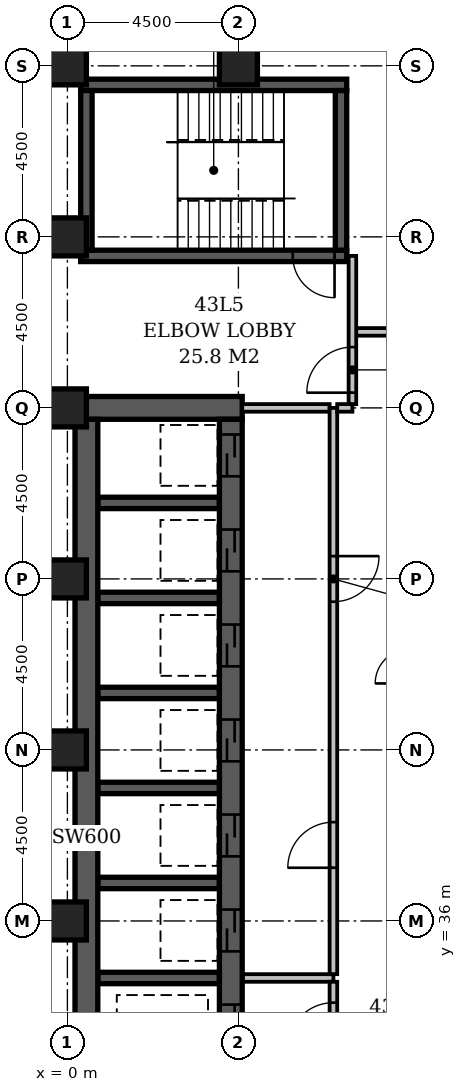
"""IFC4 building model, lengths in metres.
Left out: names, types, materials, properties, quantities, classifications, styles, units other than length and angle.
Written with IfcOpenShell. Run it as: python <this file> out.ifc"""

import sys

from ifc_helpers import new_model, si_unit, direction, frame, frame_2d, origin, origin_2d, place, context, subcontext, project, spatial, rectangle, extrude, element, fill, save


model = new_model("IFC4")
c1 = context("Model", 3, precision=1e-05, world=origin(), true_north=direction((0.0, 1.0)))
c2 = subcontext(c1, "Body", "Model", "MODEL_VIEW")
j1 = project(units=[si_unit("LENGTHUNIT", "METRE"), si_unit("PLANEANGLEUNIT", "RADIAN")], contexts=[c1])
p1 = place(None, origin())
s1 = spatial("IfcSite", under=j1, at=p1, CompositionType="ELEMENT")
p2 = place(p1, origin())
s2 = spatial("IfcBuilding", under=s1, at=p2, CompositionType="ELEMENT")
p3 = place(p2, frame((0.0, 0.0, 170.0)))
s3 = spatial("IfcBuildingStorey", under=s2, at=p3, CompositionType="ELEMENT", Elevation=170.0)
p4 = place(p3, frame((0.2, 49.5, -0.3), z_axis=(0.0, 0.0, 1.0), x_axis=(1.0, 0.0, 0.0)))
e1 = element("IfcWall", 1, at=p4, inside=s3, PredefinedType="SHEAR", context=c2, shape_type="SweptSolid", body=[
    extrude(rectangle(XDim=4.4, YDim=0.6, at=frame_2d((2.2, 0.0))), origin(), (0.0, 0.0, 1.0), 3.45),
])
p5 = place(p3, frame((0.35, 53.5, -0.3), z_axis=(0.0, 0.0, 1.0), x_axis=(1.0, 0.0, 0.0)))
e2 = element("IfcWall", 2, at=p5, inside=s3, PredefinedType="SHEAR", context=c2, shape_type="SweptSolid", body=[
    extrude(rectangle(XDim=7.0, YDim=0.3, at=frame_2d((3.5, 0.0))), origin(), (0.0, 0.0, 1.0), 3.45),
])
p6 = place(p5, frame((5.58, 0.0, 0.3)))
e3 = element("IfcOpeningElement", 3, at=p6, cuts=e2, PredefinedType="OPENING", context=c2, shape_type="SweptSolid", body=[
    extrude(rectangle(XDim=1.1, YDim=2.1, at=frame_2d((0.55, 1.05))), frame((0.0, 0.162, 0.0), z_axis=(0.0, -1.0, 0.0), x_axis=(1.0, 0.0, 0.0)), (0.0, 0.0, 1.0), 0.324),
])
p7 = place(p3, frame((0.35, 58.0, -0.3), z_axis=(0.0, 0.0, 1.0), x_axis=(1.0, 0.0, 0.0)))
e4 = element("IfcWall", 4, at=p7, inside=s3, PredefinedType="SHEAR", context=c2, shape_type="SweptSolid", body=[
    extrude(rectangle(XDim=7.0, YDim=0.3, at=frame_2d((3.5, 0.0))), origin(), (0.0, 0.0, 1.0), 3.45),
])
p8 = place(p3, frame((0.5, 27.15, -0.3), z_axis=(0.0, 0.0, 1.0), x_axis=(0.0, 1.0, 0.0)))
e5 = element("IfcWall", 5, at=p8, inside=s3, PredefinedType="SHEAR", context=c2, shape_type="SweptSolid", body=[
    extrude(rectangle(XDim=22.05, YDim=0.6, at=frame_2d((11.025, 0.0))), origin(), (0.0, 0.0, 1.0), 3.45),
])
p9 = place(p3, frame((0.5, 53.65, -0.3), z_axis=(0.0, 0.0, 1.0), x_axis=(0.0, 1.0, 0.0)))
e6 = element("IfcWall", 6, at=p9, inside=s3, PredefinedType="SHEAR", context=c2, shape_type="SweptSolid", body=[
    extrude(rectangle(XDim=4.2, YDim=0.3, at=frame_2d((2.1, 0.0))), origin(), (0.0, 0.0, 1.0), 3.45),
])
for number, where, z_axis, x_axis in (
    (7, (0.8, 34.5, -0.3), (0.0, 0.0, 1.0), (1.0, 0.0, 0.0)),
    (8, (0.8, 37.0, -0.3), (0.0, 0.0, 1.0), (1.0, 0.0, 0.0)),
    (9, (0.8, 39.5, -0.3), (0.0, 0.0, 1.0), (1.0, 0.0, 0.0)),
    (10, (0.8, 42.0, -0.3), (0.0, 0.0, 1.0), (1.0, 0.0, 0.0)),
    (11, (0.8, 44.5, -0.3), (0.0, 0.0, 1.0), (1.0, 0.0, 0.0)),
    (12, (0.8, 47.0, -0.3), (0.0, 0.0, 1.0), (1.0, 0.0, 0.0)),
):
    element("IfcWall", number, at=place(p3, frame(where, z_axis=z_axis, x_axis=x_axis)), inside=s3, PredefinedType="SHEAR", context=c2, shape_type="SweptSolid", body=[
        extrude(rectangle(XDim=3.2, YDim=0.3, at=frame_2d((1.6, 0.0))), origin(), (0.0, 0.0, 1.0), 3.45),
    ])
p10 = place(p3, frame((4.3, 27.15, -0.3), z_axis=(0.0, 0.0, 1.0), x_axis=(0.0, 1.0, 0.0)))
e13 = element("IfcWall", 13, at=p10, inside=s3, PredefinedType="SHEAR", context=c2, shape_type="SweptSolid", body=[
    extrude(rectangle(XDim=22.05, YDim=0.6, at=frame_2d((11.025, 0.0))), origin(), (0.0, 0.0, 1.0), 3.45),
])
p11 = place(p10, frame((3.05, 0.0, 0.3)))
e14 = element("IfcOpeningElement", 14, at=p11, cuts=e13, PredefinedType="OPENING", context=c2, shape_type="SweptSolid", body=[
    extrude(rectangle(XDim=1.1, YDim=2.1, at=frame_2d((0.55, 1.05))), frame((0.0, 0.312, 0.0), z_axis=(0.0, -1.0, 0.0), x_axis=(1.0, 0.0, 0.0)), (0.0, 0.0, 1.0), 0.624),
])
p12 = place(p10, frame((0.55, 0.0, 0.3)))
e15 = element("IfcOpeningElement", 15, at=p12, cuts=e13, PredefinedType="OPENING", context=c2, shape_type="SweptSolid", body=[
    extrude(rectangle(XDim=1.1, YDim=2.1, at=frame_2d((0.55, 1.05))), frame((0.0, 0.312, 0.0), z_axis=(0.0, -1.0, 0.0), x_axis=(1.0, 0.0, 0.0)), (0.0, 0.0, 1.0), 0.624),
])
p13 = place(p10, frame((20.55, 0.0, 0.3)))
e16 = element("IfcOpeningElement", 16, at=p13, cuts=e13, PredefinedType="OPENING", context=c2, shape_type="SweptSolid", body=[
    extrude(rectangle(XDim=1.1, YDim=2.1, at=frame_2d((0.55, 1.05))), frame((0.0, 0.312, 0.0), z_axis=(0.0, -1.0, 0.0), x_axis=(1.0, 0.0, 0.0)), (0.0, 0.0, 1.0), 0.624),
])
p14 = place(p10, frame((18.05, 0.0, 0.3)))
e17 = element("IfcOpeningElement", 17, at=p14, cuts=e13, PredefinedType="OPENING", context=c2, shape_type="SweptSolid", body=[
    extrude(rectangle(XDim=1.1, YDim=2.1, at=frame_2d((0.55, 1.05))), frame((0.0, 0.312, 0.0), z_axis=(0.0, -1.0, 0.0), x_axis=(1.0, 0.0, 0.0)), (0.0, 0.0, 1.0), 0.624),
])
p15 = place(p10, frame((15.55, 0.0, 0.3)))
e18 = element("IfcOpeningElement", 18, at=p15, cuts=e13, PredefinedType="OPENING", context=c2, shape_type="SweptSolid", body=[
    extrude(rectangle(XDim=1.1, YDim=2.1, at=frame_2d((0.55, 1.05))), frame((0.0, 0.312, 0.0), z_axis=(0.0, -1.0, 0.0), x_axis=(1.0, 0.0, 0.0)), (0.0, 0.0, 1.0), 0.624),
])
p16 = place(p10, frame((13.05, 0.0, 0.3)))
e19 = element("IfcOpeningElement", 19, at=p16, cuts=e13, PredefinedType="OPENING", context=c2, shape_type="SweptSolid", body=[
    extrude(rectangle(XDim=1.1, YDim=2.1, at=frame_2d((0.55, 1.05))), frame((0.0, 0.312, 0.0), z_axis=(0.0, -1.0, 0.0), x_axis=(1.0, 0.0, 0.0)), (0.0, 0.0, 1.0), 0.624),
])
p17 = place(p10, frame((10.55, 0.0, 0.3)))
e20 = element("IfcOpeningElement", 20, at=p17, cuts=e13, PredefinedType="OPENING", context=c2, shape_type="SweptSolid", body=[
    extrude(rectangle(XDim=1.1, YDim=2.1, at=frame_2d((0.55, 1.05))), frame((0.0, 0.312, 0.0), z_axis=(0.0, -1.0, 0.0), x_axis=(1.0, 0.0, 0.0)), (0.0, 0.0, 1.0), 0.624),
])
p18 = place(p10, frame((8.05, 0.0, 0.3)))
e21 = element("IfcOpeningElement", 21, at=p18, cuts=e13, PredefinedType="OPENING", context=c2, shape_type="SweptSolid", body=[
    extrude(rectangle(XDim=1.1, YDim=2.1, at=frame_2d((0.55, 1.05))), frame((0.0, 0.312, 0.0), z_axis=(0.0, -1.0, 0.0), x_axis=(1.0, 0.0, 0.0)), (0.0, 0.0, 1.0), 0.624),
])
p19 = place(p10, frame((5.55, 0.0, 0.3)))
e22 = element("IfcOpeningElement", 22, at=p19, cuts=e13, PredefinedType="OPENING", context=c2, shape_type="SweptSolid", body=[
    extrude(rectangle(XDim=1.1, YDim=2.1, at=frame_2d((0.55, 1.05))), frame((0.0, 0.312, 0.0), z_axis=(0.0, -1.0, 0.0), x_axis=(1.0, 0.0, 0.0)), (0.0, 0.0, 1.0), 0.624),
])
p20 = place(p3, frame((7.2, 53.65, -0.3), z_axis=(0.0, 0.0, 1.0), x_axis=(0.0, 1.0, 0.0)))
e23 = element("IfcWall", 23, at=p20, inside=s3, PredefinedType="SHEAR", context=c2, shape_type="SweptSolid", body=[
    extrude(rectangle(XDim=4.2, YDim=0.3, at=frame_2d((2.1, 0.0))), origin(), (0.0, 0.0, 1.0), 3.45),
])
for number, where, z_axis, x_axis in (
    (24, (0.0, 36.0, -0.3), (0.0, 0.0, 1.0), (1.0, 0.0, 0.0)),
    (25, (0.0, 40.5, -0.3), (0.0, 0.0, 1.0), (1.0, 0.0, 0.0)),
    (26, (0.0, 45.0, -0.3), (0.0, 0.0, 1.0), (1.0, 0.0, 0.0)),
    (27, (0.0, 49.5, -0.3), (0.0, 0.0, 1.0), (1.0, 0.0, 0.0)),
    (28, (0.0, 54.0, -0.3), (0.0, 0.0, 1.0), (1.0, 0.0, 0.0)),
    (29, (0.0, 58.5, -0.3), (0.0, 0.0, 1.0), (1.0, 0.0, 0.0)),
    (30, (4.5, 58.5, -0.3), (0.0, 0.0, 1.0), (1.0, 0.0, 0.0)),
):
    element("IfcColumn", number, at=place(p3, frame(where, z_axis=z_axis, x_axis=x_axis)), inside=s3, PredefinedType="COLUMN", context=c2, shape_type="SweptSolid", body=[
        extrude(rectangle(XDim=1.0, YDim=1.0, at=origin_2d()), origin(), (0.0, 0.0, 1.0), 3.45),
    ])
p21 = place(p3, frame((4.62, 34.5, 0.0), z_axis=(0.0, 0.0, 1.0), x_axis=(1.0, 0.0, 0.0)))
e31 = element("IfcWall", 31, at=p21, inside=s3, PredefinedType="PARTITIONING", context=c2, shape_type="SweptSolid", body=[
    extrude(rectangle(XDim=2.38, YDim=0.2, at=frame_2d((1.19, 0.0))), origin(), (0.0, 0.0, 1.0), 3.15),
])
p22 = place(p3, frame((7.0, 34.6, 0.0), z_axis=(0.0, 0.0, 1.0), x_axis=(0.0, 1.0, 0.0)))
e32 = element("IfcWall", 32, at=p22, inside=s3, PredefinedType="PARTITIONING", context=c2, shape_type="SweptSolid", body=[
    extrude(rectangle(XDim=14.9, YDim=0.2, at=frame_2d((7.45, 0.0))), origin(), (0.0, 0.0, 1.0), 3.15),
])
p23 = place(p22, frame((2.8, 0.0, 0.0)))
e33 = element("IfcOpeningElement", 33, at=p23, cuts=e32, PredefinedType="OPENING", context=c2, shape_type="SweptSolid", body=[
    extrude(rectangle(XDim=1.2, YDim=2.1, at=frame_2d((0.6, 1.05))), frame((0.0, 0.112, 0.0), z_axis=(0.0, -1.0, 0.0), x_axis=(1.0, 0.0, 0.0)), (0.0, 0.0, 1.0), 0.224),
])
p24 = place(p22, frame((9.8, 0.0, 0.0)))
e34 = element("IfcOpeningElement", 34, at=p24, cuts=e32, PredefinedType="OPENING", context=c2, shape_type="SweptSolid", body=[
    extrude(rectangle(XDim=1.2, YDim=2.1, at=frame_2d((0.6, 1.05))), frame((0.0, 0.112, 0.0), z_axis=(0.0, -1.0, 0.0), x_axis=(1.0, 0.0, 0.0)), (0.0, 0.0, 1.0), 0.224),
])
p25 = place(p3, frame((4.6, 49.5, 0.0), z_axis=(0.0, 0.0, 1.0), x_axis=(1.0, 0.0, 0.0)))
e35 = element("IfcWall", 35, at=p25, inside=s3, PredefinedType="PARTITIONING", context=c2, shape_type="SweptSolid", body=[
    extrude(rectangle(XDim=2.3, YDim=0.2, at=frame_2d((1.15, 0.0))), origin(), (0.0, 0.0, 1.0), 3.15),
])
p26 = place(p3, frame((7.0, 32.1, 0.0), z_axis=(0.0, 0.0, 1.0), x_axis=(0.0, 1.0, 0.0)))
e36 = element("IfcWall", 36, at=p26, inside=s3, PredefinedType="PARTITIONING", context=c2, shape_type="SweptSolid", body=[
    extrude(rectangle(XDim=2.3, YDim=0.2, at=frame_2d((1.15, 0.0))), origin(), (0.0, 0.0, 1.0), 3.15),
])
p27 = place(p26, frame((0.55, 0.0, 0.0)))
e37 = element("IfcOpeningElement", 37, at=p27, cuts=e36, PredefinedType="OPENING", context=c2, shape_type="SweptSolid", body=[
    extrude(rectangle(XDim=1.2, YDim=2.1, at=frame_2d((0.6, 1.05))), frame((0.0, 0.112, 0.0), z_axis=(0.0, -1.0, 0.0), x_axis=(1.0, 0.0, 0.0)), (0.0, 0.0, 1.0), 0.224),
])
p28 = place(p3, frame((7.1, 49.5, 0.0), z_axis=(0.0, 0.0, 1.0), x_axis=(1.0, 0.0, 0.0)))
e38 = element("IfcWall", 38, at=p28, inside=s3, PredefinedType="PARTITIONING", context=c2, shape_type="SweptSolid", body=[
    extrude(rectangle(XDim=0.4, YDim=0.2, at=frame_2d((0.2, 0.0))), origin(), (0.0, 0.0, 1.0), 3.15),
])
p29 = place(p3, frame((7.5, 49.6, 0.0), z_axis=(0.0, 0.0, 1.0), x_axis=(0.0, 1.0, 0.0)))
e39 = element("IfcWall", 39, at=p29, inside=s3, PredefinedType="PARTITIONING", context=c2, shape_type="SweptSolid", body=[
    extrude(rectangle(XDim=3.9, YDim=0.2, at=frame_2d((1.95, 0.0))), origin(), (0.0, 0.0, 1.0), 3.15),
])
p30 = place(p29, frame((0.3, 0.0, 0.0)))
e40 = element("IfcOpeningElement", 40, at=p30, cuts=e39, PredefinedType="OPENING", context=c2, shape_type="SweptSolid", body=[
    extrude(rectangle(XDim=1.2, YDim=2.1, at=frame_2d((0.6, 1.05))), frame((0.0, 0.112, 0.0), z_axis=(0.0, -1.0, 0.0), x_axis=(1.0, 0.0, 0.0)), (0.0, 0.0, 1.0), 0.224),
])
p31 = place(p3, frame((7.6, 51.5, 0.0), z_axis=(0.0, 0.0, 1.0), x_axis=(1.0, 0.0, 0.0)))
e41 = element("IfcWall", 41, at=p31, inside=s3, PredefinedType="PARTITIONING", context=c2, shape_type="SweptSolid", body=[
    extrude(rectangle(XDim=15.3, YDim=0.2, at=frame_2d((7.65, 0.0))), origin(), (0.0, 0.0, 1.0), 3.15),
])
p32 = place(p31, frame((4.975, 0.0, 0.0)))
e42 = element("IfcOpeningElement", 42, at=p32, cuts=e41, PredefinedType="OPENING", context=c2, shape_type="SweptSolid", body=[
    extrude(rectangle(XDim=0.9, YDim=2.1, at=frame_2d((0.45, 1.05))), frame((0.0, 0.112, 0.0), z_axis=(0.0, -1.0, 0.0), x_axis=(1.0, 0.0, 0.0)), (0.0, 0.0, 1.0), 0.224),
])
p33 = place(p31, frame((12.725, 0.0, 0.0)))
e43 = element("IfcOpeningElement", 43, at=p33, cuts=e41, PredefinedType="OPENING", context=c2, shape_type="SweptSolid", body=[
    extrude(rectangle(XDim=0.9, YDim=2.1, at=frame_2d((0.45, 1.05))), frame((0.0, 0.112, 0.0), z_axis=(0.0, -1.0, 0.0), x_axis=(1.0, 0.0, 0.0)), (0.0, 0.0, 1.0), 0.224),
])
p34 = place(p30, origin())
e44 = element("IfcDoor", 44, at=p34, inside=s3, OperationType="SINGLE_SWING_LEFT", PredefinedType="DOOR", context=c2, shape_type="SweptSolid", body=[
    extrude(rectangle(XDim=1.2, YDim=2.1, at=frame_2d((0.6, 1.05))), frame((0.0, 0.025, 0.0), z_axis=(0.0, -1.0, 0.0), x_axis=(1.0, 0.0, 0.0)), (0.0, 0.0, 1.0), 0.05),
])
fill(e40, e44)
p35 = place(p13, origin())
e45 = element("IfcDoor", 45, at=p35, inside=s3, OperationType="SLIDING_TO_LEFT", PredefinedType="DOOR", context=c2, shape_type="SweptSolid", body=[
    extrude(rectangle(XDim=1.1, YDim=2.1, at=frame_2d((0.55, 1.05))), frame((0.0, 0.025, 0.0), z_axis=(0.0, -1.0, 0.0), x_axis=(1.0, 0.0, 0.0)), (0.0, 0.0, 1.0), 0.05),
])
fill(e16, e45)
p36 = place(p14, origin())
e46 = element("IfcDoor", 46, at=p36, inside=s3, OperationType="SLIDING_TO_LEFT", PredefinedType="DOOR", context=c2, shape_type="SweptSolid", body=[
    extrude(rectangle(XDim=1.1, YDim=2.1, at=frame_2d((0.55, 1.05))), frame((0.0, 0.025, 0.0), z_axis=(0.0, -1.0, 0.0), x_axis=(1.0, 0.0, 0.0)), (0.0, 0.0, 1.0), 0.05),
])
fill(e17, e46)
p37 = place(p15, origin())
e47 = element("IfcDoor", 47, at=p37, inside=s3, OperationType="SLIDING_TO_LEFT", PredefinedType="DOOR", context=c2, shape_type="SweptSolid", body=[
    extrude(rectangle(XDim=1.1, YDim=2.1, at=frame_2d((0.55, 1.05))), frame((0.0, 0.025, 0.0), z_axis=(0.0, -1.0, 0.0), x_axis=(1.0, 0.0, 0.0)), (0.0, 0.0, 1.0), 0.05),
])
fill(e18, e47)
p38 = place(p16, origin())
e48 = element("IfcDoor", 48, at=p38, inside=s3, OperationType="SLIDING_TO_LEFT", PredefinedType="DOOR", context=c2, shape_type="SweptSolid", body=[
    extrude(rectangle(XDim=1.1, YDim=2.1, at=frame_2d((0.55, 1.05))), frame((0.0, 0.025, 0.0), z_axis=(0.0, -1.0, 0.0), x_axis=(1.0, 0.0, 0.0)), (0.0, 0.0, 1.0), 0.05),
])
fill(e19, e48)
p39 = place(p17, origin())
e49 = element("IfcDoor", 49, at=p39, inside=s3, OperationType="SLIDING_TO_LEFT", PredefinedType="DOOR", context=c2, shape_type="SweptSolid", body=[
    extrude(rectangle(XDim=1.1, YDim=2.1, at=frame_2d((0.55, 1.05))), frame((0.0, 0.025, 0.0), z_axis=(0.0, -1.0, 0.0), x_axis=(1.0, 0.0, 0.0)), (0.0, 0.0, 1.0), 0.05),
])
fill(e20, e49)
p40 = place(p18, origin())
e50 = element("IfcDoor", 50, at=p40, inside=s3, OperationType="SLIDING_TO_LEFT", PredefinedType="DOOR", context=c2, shape_type="SweptSolid", body=[
    extrude(rectangle(XDim=1.1, YDim=2.1, at=frame_2d((0.55, 1.05))), frame((0.0, 0.025, 0.0), z_axis=(0.0, -1.0, 0.0), x_axis=(1.0, 0.0, 0.0)), (0.0, 0.0, 1.0), 0.05),
])
fill(e21, e50)
p41 = place(p23, origin())
e51 = element("IfcDoor", 51, at=p41, inside=s3, OperationType="SINGLE_SWING_LEFT", PredefinedType="DOOR", context=c2, shape_type="SweptSolid", body=[
    extrude(rectangle(XDim=1.2, YDim=2.1, at=frame_2d((0.6, 1.05))), frame((0.0, 0.025, 0.0), z_axis=(0.0, -1.0, 0.0), x_axis=(1.0, 0.0, 0.0)), (0.0, 0.0, 1.0), 0.05),
])
fill(e33, e51)
p42 = place(p24, origin())
e52 = element("IfcDoor", 52, at=p42, inside=s3, OperationType="SINGLE_SWING_RIGHT", PredefinedType="DOOR", context=c2, shape_type="SweptSolid", body=[
    extrude(rectangle(XDim=1.2, YDim=2.1, at=frame_2d((0.6, 1.05))), frame((0.0, 0.025, 0.0), z_axis=(0.0, -1.0, 0.0), x_axis=(1.0, 0.0, 0.0)), (0.0, 0.0, 1.0), 0.05),
])
fill(e34, e52)
p43 = place(p27, origin())
e53 = element("IfcDoor", 53, at=p43, inside=s3, OperationType="SINGLE_SWING_LEFT", PredefinedType="DOOR", context=c2, shape_type="SweptSolid", body=[
    extrude(rectangle(XDim=1.2, YDim=2.1, at=frame_2d((0.6, 1.05))), frame((0.0, 0.025, 0.0), z_axis=(0.0, -1.0, 0.0), x_axis=(1.0, 0.0, 0.0)), (0.0, 0.0, 1.0), 0.05),
])
fill(e37, e53)
p44 = place(p19, origin())
e54 = element("IfcDoor", 54, at=p44, inside=s3, OperationType="SLIDING_TO_LEFT", PredefinedType="DOOR", context=c2, shape_type="SweptSolid", body=[
    extrude(rectangle(XDim=1.1, YDim=2.1, at=frame_2d((0.55, 1.05))), frame((0.0, 0.025, 0.0), z_axis=(0.0, -1.0, 0.0), x_axis=(1.0, 0.0, 0.0)), (0.0, 0.0, 1.0), 0.05),
])
fill(e22, e54)
p45 = place(p6, origin())
e55 = element("IfcDoor", 55, at=p45, inside=s3, OperationType="SINGLE_SWING_RIGHT", PredefinedType="DOOR", context=c2, shape_type="SweptSolid", body=[
    extrude(rectangle(XDim=1.1, YDim=2.1, at=frame_2d((0.55, 1.05))), frame((0.0, 0.025, 0.0), z_axis=(0.0, -1.0, 0.0), x_axis=(1.0, 0.0, 0.0)), (0.0, 0.0, 1.0), 0.05),
])
fill(e3, e55)
save(model, sys.argv[1])
